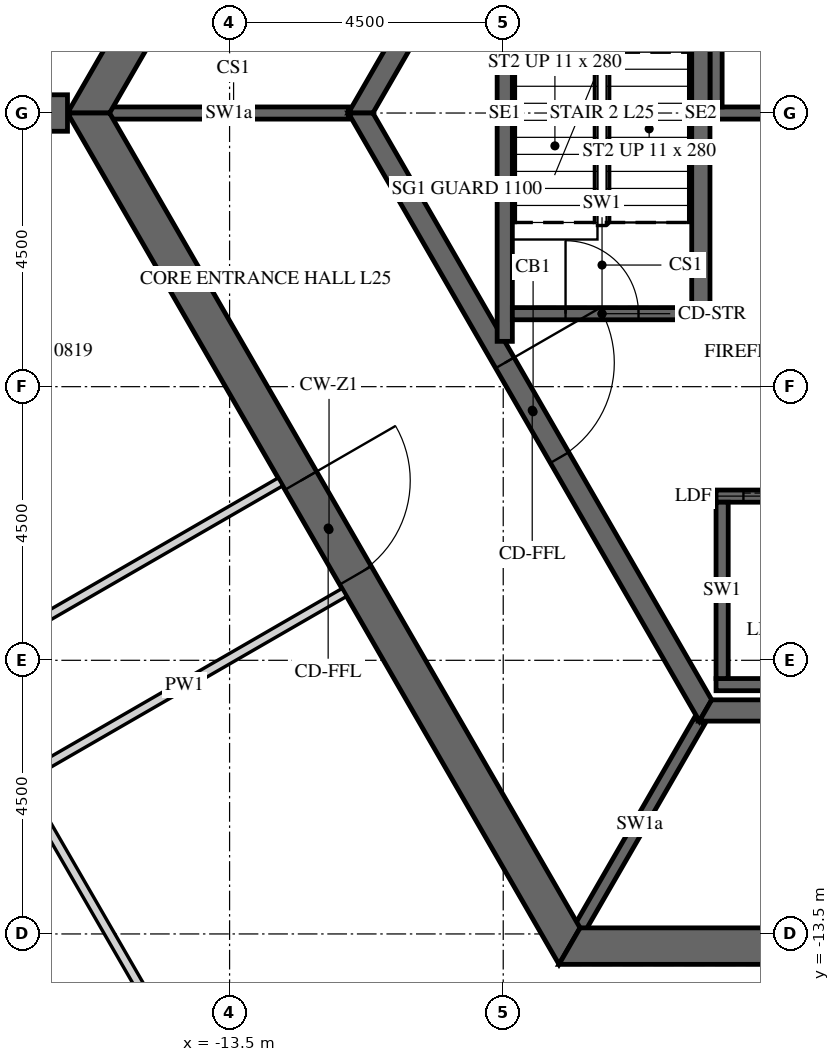
"""IFC4 building model, lengths in metres.
Left out: names, types, materials, properties, quantities, classifications, styles, units other than length and angle.
Written with IfcOpenShell. Run it as: python <this file> out.ifc"""

import sys

from ifc_helpers import new_model, si_unit, direction, frame, frame_2d, origin, place, context, subcontext, project, spatial, polyline, rectangle, outline, extrude, element, fill, save


model = new_model("IFC4")
c1 = context("Model", 3, precision=1e-05, world=origin(), true_north=direction((0.0, 1.0)))
c2 = subcontext(c1, "Body", "Model", "MODEL_VIEW")
j1 = project(units=[si_unit("LENGTHUNIT", "METRE"), si_unit("PLANEANGLEUNIT", "RADIAN")], contexts=[c1])
p1 = place(None, origin())
s1 = spatial("IfcSite", under=j1, at=p1, CompositionType="ELEMENT")
p2 = place(p1, origin())
s2 = spatial("IfcBuilding", under=s1, at=p2, CompositionType="ELEMENT")
p3 = place(p2, frame((0.0, 0.0, 111.6)))
s3 = spatial("IfcBuildingStorey", under=s2, at=p3, CompositionType="ELEMENT", Elevation=111.6)
p4 = place(p3, frame((-7.91, 13.7, -0.15), z_axis=(0.0, 0.0, 1.0), x_axis=(-0.499999880136, -0.866025472988, 0.0)))
e1 = element("IfcWall", 1, at=p4, inside=s3, PredefinedType="SHEAR", context=c2, shape_type="SweptSolid", body=[
    extrude(outline(polyline([(-0.173, -0.3), (15.993, -0.3), (15.646, 0.3), (0.173, 0.3), (-0.173, -0.3)])), origin(), (0.0, 0.0, 1.0), 3.9),
])
p5 = place(p4, frame((7.039, 0.0, 0.15)))
e2 = element("IfcOpeningElement", 2, at=p5, cuts=e1, PredefinedType="OPENING", context=c2, shape_type="SweptSolid", body=[
    extrude(rectangle(XDim=1.8, YDim=2.4, at=frame_2d((0.9, 1.2))), frame((0.0, 0.31, 0.0), z_axis=(0.0, -1.0, 0.0), x_axis=(1.0, 0.0, 0.0)), (0.0, 0.0, 1.0), 0.62),
])
p6 = place(p3, frame((-15.819, 0.0, -0.15), z_axis=(0.0, 0.0, 1.0), x_axis=(0.499999880136, -0.866025472988, 0.0)))
e3 = element("IfcWall", 3, at=p6, inside=s3, PredefinedType="SHEAR", context=c2, shape_type="SweptSolid", body=[
    extrude(outline(polyline([(-0.173, -0.3), (15.993, -0.3), (15.646, 0.3), (0.173, 0.3), (-0.173, -0.3)])), origin(), (0.0, 0.0, 1.0), 3.9),
])
p7 = place(p6, frame((6.981, 0.0, 0.15)))
e4 = element("IfcOpeningElement", 4, at=p7, cuts=e3, PredefinedType="OPENING", context=c2, shape_type="SweptSolid", body=[
    extrude(rectangle(XDim=1.8, YDim=2.4, at=frame_2d((0.9, 1.2))), frame((0.0, 0.31, 0.0), z_axis=(0.0, -1.0, 0.0), x_axis=(1.0, 0.0, 0.0)), (0.0, 0.0, 1.0), 0.62),
])
p8 = place(p3, frame((-7.91, -13.7, -0.15), z_axis=(0.0, 0.0, 1.0), x_axis=(1.0, 0.0, 0.0)))
e5 = element("IfcWall", 5, at=p8, inside=s3, PredefinedType="SHEAR", context=c2, shape_type="SweptSolid", body=[
    extrude(outline(polyline([(-0.173, -0.3), (15.993, -0.3), (15.646, 0.3), (0.173, 0.3), (-0.173, -0.3)])), origin(), (0.0, 0.0, 1.0), 3.9),
])
p9 = place(p8, frame((7.31, 0.0, 0.15)))
e6 = element("IfcOpeningElement", 6, at=p9, cuts=e5, PredefinedType="OPENING", context=c2, shape_type="SweptSolid", body=[
    extrude(rectangle(XDim=1.2, YDim=2.4, at=frame_2d((0.6, 1.2))), frame((0.0, 0.31, 0.0), z_axis=(0.0, -1.0, 0.0), x_axis=(1.0, 0.0, 0.0)), (0.0, 0.0, 1.0), 0.62),
])
p10 = place(p3, frame((-16.166, 0.0, -0.15), z_axis=(0.0, 0.0, 1.0), x_axis=(-1.0, 0.0, 0.0)))
e7 = element("IfcWall", 7, at=p10, inside=s3, PredefinedType="SHEAR", context=c2, shape_type="SweptSolid", body=[
    extrude(rectangle(XDim=16.509, YDim=0.6, at=frame_2d((8.254, 0.0))), origin(), (0.0, 0.0, 1.0), 3.9),
])
p11 = place(p10, frame((7.354, 0.0, 0.15)))
e8 = element("IfcOpeningElement", 8, at=p11, cuts=e7, PredefinedType="OPENING", context=c2, shape_type="SweptSolid", body=[
    extrude(rectangle(XDim=1.8, YDim=2.4, at=frame_2d((0.9, 1.2))), frame((0.0, 0.31, 0.0), z_axis=(0.0, -1.0, 0.0), x_axis=(1.0, 0.0, 0.0)), (0.0, 0.0, 1.0), 0.62),
])
p12 = place(p3, frame((-5.673, 9.825, -0.15), z_axis=(0.0, 0.0, 1.0), x_axis=(-0.499995046907, -0.866028263435, 0.0)))
e9 = element("IfcWall", 9, at=p12, inside=s3, PredefinedType="SHEAR", context=c2, shape_type="SweptSolid", body=[
    extrude(outline(polyline([(-0.101, -0.175), (11.446, -0.175), (11.244, 0.175), (0.101, 0.175), (-0.101, -0.175)])), origin(), (0.0, 0.0, 1.0), 3.9),
])
p13 = place(p12, frame((4.801, 0.0, 0.15)))
e10 = element("IfcOpeningElement", 10, at=p13, cuts=e9, PredefinedType="OPENING", context=c2, shape_type="SweptSolid", body=[
    extrude(rectangle(XDim=1.8, YDim=2.4, at=frame_2d((0.9, 1.2))), frame((0.0, 0.185, 0.0), z_axis=(0.0, -1.0, 0.0), x_axis=(1.0, 0.0, 0.0)), (0.0, 0.0, 1.0), 0.37),
])
p14 = place(p3, frame((-11.345, 0.0, -0.15), z_axis=(0.0, 0.0, 1.0), x_axis=(0.499995046907, -0.866028263435, 0.0)))
e11 = element("IfcWall", 11, at=p14, inside=s3, PredefinedType="SHEAR", context=c2, shape_type="SweptSolid", body=[
    extrude(outline(polyline([(-0.101, -0.175), (11.446, -0.175), (11.244, 0.175), (0.101, 0.175), (-0.101, -0.175)])), origin(), (0.0, 0.0, 1.0), 3.9),
])
p15 = place(p14, frame((4.744, 0.0, 0.15)))
e12 = element("IfcOpeningElement", 12, at=p15, cuts=e11, PredefinedType="OPENING", context=c2, shape_type="SweptSolid", body=[
    extrude(rectangle(XDim=1.8, YDim=2.4, at=frame_2d((0.9, 1.2))), frame((0.0, 0.185, 0.0), z_axis=(0.0, -1.0, 0.0), x_axis=(1.0, 0.0, 0.0)), (0.0, 0.0, 1.0), 0.37),
])
p16 = place(p3, frame((-5.673, -9.825, -0.15), z_axis=(0.0, 0.0, 1.0), x_axis=(1.0, 0.0, 0.0)))
e13 = element("IfcWall", 13, at=p16, inside=s3, PredefinedType="SHEAR", context=c2, shape_type="SweptSolid", body=[
    extrude(outline(polyline([(-0.101, -0.175), (11.446, -0.175), (11.244, 0.175), (0.101, 0.175), (-0.101, -0.175)])), origin(), (0.0, 0.0, 1.0), 3.9),
])
p17 = place(p3, frame((-5.6, 0.0, -0.25), z_axis=(0.0, 0.0, 1.0), x_axis=(1.0, 0.0, 0.0)))
e14 = element("IfcWall", 14, at=p17, inside=s3, PredefinedType="SHEAR", context=c2, shape_type="SweptSolid", body=[
    extrude(rectangle(XDim=11.2, YDim=0.2, at=frame_2d((5.6, 0.0))), origin(), (0.0, 0.0, 1.0), 3.9),
])
p18 = place(p3, frame((-5.5, 0.1, -0.25), z_axis=(0.0, 0.0, 1.0), x_axis=(0.0, 1.0, 0.0)))
e15 = element("IfcWall", 15, at=p18, inside=s3, PredefinedType="SHEAR", context=c2, shape_type="SweptSolid", body=[
    extrude(rectangle(XDim=3.1, YDim=0.2, at=frame_2d((1.55, 0.0))), origin(), (0.0, 0.0, 1.0), 3.9),
])
p19 = place(p3, frame((-5.5, -6.3, -0.25), z_axis=(0.0, 0.0, 1.0), x_axis=(1.0, 0.0, 0.0)))
e16 = element("IfcWall", 16, at=p19, inside=s3, PredefinedType="SHEAR", context=c2, shape_type="SweptSolid", body=[
    extrude(rectangle(XDim=9.2, YDim=0.2, at=frame_2d((4.6, 0.0))), origin(), (0.0, 0.0, 1.0), 3.9),
])
p20 = place(p19, frame((0.45, 0.0, 0.25)))
e17 = element("IfcOpeningElement", 17, at=p20, cuts=e16, PredefinedType="OPENING", context=c2, shape_type="SweptSolid", body=[
    extrude(rectangle(XDim=1.1, YDim=2.1, at=frame_2d((0.55, 1.05))), frame((0.0, 0.11, 0.0), z_axis=(0.0, -1.0, 0.0), x_axis=(1.0, 0.0, 0.0)), (0.0, 0.0, 1.0), 0.22),
])
p21 = place(p19, frame((2.25, 0.0, 0.25)))
e18 = element("IfcOpeningElement", 18, at=p21, cuts=e16, PredefinedType="OPENING", context=c2, shape_type="SweptSolid", body=[
    extrude(rectangle(XDim=1.1, YDim=2.1, at=frame_2d((0.55, 1.05))), frame((0.0, 0.11, 0.0), z_axis=(0.0, -1.0, 0.0), x_axis=(1.0, 0.0, 0.0)), (0.0, 0.0, 1.0), 0.22),
])
p22 = place(p19, frame((4.05, 0.0, 0.25)))
e19 = element("IfcOpeningElement", 19, at=p22, cuts=e16, PredefinedType="OPENING", context=c2, shape_type="SweptSolid", body=[
    extrude(rectangle(XDim=1.1, YDim=2.1, at=frame_2d((0.55, 1.05))), frame((0.0, 0.11, 0.0), z_axis=(0.0, -1.0, 0.0), x_axis=(1.0, 0.0, 0.0)), (0.0, 0.0, 1.0), 0.22),
])
p23 = place(p19, frame((5.85, 0.0, 0.25)))
e20 = element("IfcOpeningElement", 20, at=p23, cuts=e16, PredefinedType="OPENING", context=c2, shape_type="SweptSolid", body=[
    extrude(rectangle(XDim=1.1, YDim=2.1, at=frame_2d((0.55, 1.05))), frame((0.0, 0.11, 0.0), z_axis=(0.0, -1.0, 0.0), x_axis=(1.0, 0.0, 0.0)), (0.0, 0.0, 1.0), 0.22),
])
p24 = place(p19, frame((7.65, 0.0, 0.25)))
e21 = element("IfcOpeningElement", 21, at=p24, cuts=e16, PredefinedType="OPENING", context=c2, shape_type="SweptSolid", body=[
    extrude(rectangle(XDim=1.1, YDim=2.1, at=frame_2d((0.55, 1.05))), frame((0.0, 0.11, 0.0), z_axis=(0.0, -1.0, 0.0), x_axis=(1.0, 0.0, 0.0)), (0.0, 0.0, 1.0), 0.22),
])
p25 = place(p3, frame((-5.5, -9.4, -0.25), z_axis=(0.0, 0.0, 1.0), x_axis=(1.0, 0.0, 0.0)))
e22 = element("IfcWall", 22, at=p25, inside=s3, PredefinedType="SHEAR", context=c2, shape_type="SweptSolid", body=[
    extrude(rectangle(XDim=9.2, YDim=0.2, at=frame_2d((4.6, 0.0))), origin(), (0.0, 0.0, 1.0), 3.9),
])
p26 = place(p3, frame((-5.4, -9.3, -0.25), z_axis=(0.0, 0.0, 1.0), x_axis=(0.0, 1.0, 0.0)))
e23 = element("IfcWall", 23, at=p26, inside=s3, PredefinedType="SHEAR", context=c2, shape_type="SweptSolid", body=[
    extrude(rectangle(XDim=2.9, YDim=0.2, at=frame_2d((1.45, 0.0))), origin(), (0.0, 0.0, 1.0), 3.9),
])
p27 = place(p3, frame((-11.547, 0.0, -0.15), z_axis=(0.0, 0.0, 1.0), x_axis=(-1.0, 0.0, 0.0)))
e24 = element("IfcWall", 24, at=p27, inside=s3, PredefinedType="SHEAR", context=c2, shape_type="SweptSolid", body=[
    extrude(rectangle(XDim=3.926, YDim=0.2, at=frame_2d((1.963, 0.0))), origin(), (0.0, 0.0, 1.0), 3.9),
])
p28 = place(p3, frame((-5.773, -10.0, -0.15), z_axis=(0.0, 0.0, 1.0), x_axis=(-0.500038251005, -0.86600331843, 0.0)))
e25 = element("IfcWall", 25, at=p28, inside=s3, PredefinedType="SHEAR", context=c2, shape_type="SweptSolid", body=[
    extrude(rectangle(XDim=3.926, YDim=0.2, at=frame_2d((1.963, 0.0))), origin(), (0.0, 0.0, 1.0), 3.9),
])
p29 = place(p3, frame((-5.75, -3.4, -0.25), z_axis=(0.0, 0.0, 1.0), x_axis=(0.0, 1.0, 0.0)))
e26 = element("IfcWall", 26, at=p29, inside=s3, PredefinedType="SHEAR", context=c2, shape_type="SweptSolid", body=[
    extrude(rectangle(XDim=6.8, YDim=0.3, at=frame_2d((3.4, 0.0))), origin(), (0.0, 0.0, 1.0), 3.9),
])
p30 = place(p3, frame((-8.975, -3.755, -0.25), z_axis=(0.0, 0.0, 1.0), x_axis=(0.0, 1.0, 0.0)))
e27 = element("IfcWall", 27, at=p30, inside=s3, PredefinedType="SHEAR", context=c2, shape_type="SweptSolid", body=[
    extrude(rectangle(XDim=7.51, YDim=0.25, at=frame_2d((3.755, 0.0))), origin(), (0.0, 0.0, 1.0), 3.9),
])
p31 = place(p3, frame((-8.85, -3.3, -0.25), z_axis=(0.0, 0.0, 1.0), x_axis=(1.0, 0.0, 0.0)))
e28 = element("IfcWall", 28, at=p31, inside=s3, PredefinedType="SHEAR", context=c2, shape_type="SweptSolid", body=[
    extrude(rectangle(XDim=2.95, YDim=0.2, at=frame_2d((1.475, 0.0))), origin(), (0.0, 0.0, 1.0), 3.9),
])
p32 = place(p31, frame((0.875, 0.0, 0.25)))
e29 = element("IfcOpeningElement", 29, at=p32, cuts=e28, PredefinedType="OPENING", context=c2, shape_type="SweptSolid", body=[
    extrude(rectangle(XDim=1.2, YDim=2.4, at=frame_2d((0.6, 1.2))), frame((0.0, 0.11, 0.0), z_axis=(0.0, -1.0, 0.0), x_axis=(1.0, 0.0, 0.0)), (0.0, 0.0, 1.0), 0.22),
])
p33 = place(p3, frame((-24.09, -2.175, 0.0), z_axis=(0.0, 0.0, 1.0), x_axis=(0.499996832073, -0.86602723278, 0.0)))
e30 = element("IfcWall", 30, at=p33, inside=s3, PredefinedType="PARTITIONING", context=c2, shape_type="SweptSolid", body=[
    extrude(rectangle(XDim=23.877, YDim=0.15, at=frame_2d((11.938, 0.0))), origin(), (0.0, 0.0, 1.0), 2.988),
])
p34 = place(p33, frame((4.643, 0.0, 0.0)))
e31 = element("IfcOpeningElement", 31, at=p34, cuts=e30, PredefinedType="OPENING", context=c2, shape_type="SweptSolid", body=[
    extrude(rectangle(XDim=1.0, YDim=2.1, at=frame_2d((0.5, 1.05))), frame((0.0, 0.085, 0.0), z_axis=(0.0, -1.0, 0.0), x_axis=(1.0, 0.0, 0.0)), (0.0, 0.0, 1.0), 0.17),
])
p35 = place(p33, frame((11.472, 0.0, 0.0)))
e32 = element("IfcOpeningElement", 32, at=p35, cuts=e30, PredefinedType="OPENING", context=c2, shape_type="SweptSolid", body=[
    extrude(rectangle(XDim=1.0, YDim=2.1, at=frame_2d((0.5, 1.05))), frame((0.0, 0.085, 0.0), z_axis=(0.0, -1.0, 0.0), x_axis=(1.0, 0.0, 0.0)), (0.0, 0.0, 1.0), 0.17),
])
p36 = place(p33, frame((21.925, 0.0, 0.0)))
e33 = element("IfcOpeningElement", 33, at=p36, cuts=e30, PredefinedType="OPENING", context=c2, shape_type="SweptSolid", body=[
    extrude(rectangle(XDim=1.0, YDim=2.1, at=frame_2d((0.5, 1.05))), frame((0.0, 0.085, 0.0), z_axis=(0.0, -1.0, 0.0), x_axis=(1.0, 0.0, 0.0)), (0.0, 0.0, 1.0), 0.17),
])
p37 = place(p3, frame((-12.664, -6.066, 0.0), z_axis=(0.0, 0.0, 1.0), x_axis=(-0.866023618125, -0.500003092839, 0.0)))
e34 = element("IfcWall", 34, at=p37, inside=s3, PredefinedType="PARTITIONING", context=c2, shape_type="SweptSolid", body=[
    extrude(rectangle(XDim=6.15, YDim=0.15, at=frame_2d((3.075, 0.0))), origin(), (0.0, 0.0, 1.0), 2.988),
])
p38 = place(p3, frame((-11.197, -20.907, 0.0), z_axis=(0.0, 0.0, 1.0), x_axis=(-0.500004557924, 0.86602277225, 0.0)))
e35 = element("IfcWall", 35, at=p38, inside=s3, PredefinedType="PARTITIONING", context=c2, shape_type="SweptSolid", body=[
    extrude(rectangle(XDim=11.487, YDim=0.15, at=frame_2d((5.743, 0.0))), origin(), (0.0, 0.0, 1.0), 2.988),
])
p39 = place(p38, frame((5.293, 0.0, 0.0)))
e36 = element("IfcOpeningElement", 36, at=p39, cuts=e35, PredefinedType="OPENING", context=c2, shape_type="SweptSolid", body=[
    extrude(rectangle(XDim=0.9, YDim=2.1, at=frame_2d((0.45, 1.05))), frame((0.0, 0.085, 0.0), z_axis=(0.0, -1.0, 0.0), x_axis=(1.0, 0.0, 0.0)), (0.0, 0.0, 1.0), 0.17),
])
p40 = place(p3, frame((-16.875, -10.922, 0.0), z_axis=(0.0, 0.0, 1.0), x_axis=(0.866023634079, 0.500003065207, 0.0)))
e37 = element("IfcWall", 37, at=p40, inside=s3, PredefinedType="PARTITIONING", context=c2, shape_type="SweptSolid", body=[
    extrude(rectangle(XDim=6.075, YDim=0.15, at=frame_2d((3.038, 0.0))), origin(), (0.0, 0.0, 1.0), 2.988),
])
p41 = place(p7, origin())
e38 = element("IfcDoor", 38, at=p41, inside=s3, OperationType="DOUBLE_DOOR_SINGLE_SWING", PredefinedType="DOOR", context=c2, shape_type="SweptSolid", body=[
    extrude(rectangle(XDim=1.8, YDim=2.4, at=frame_2d((0.9, 1.2))), frame((0.0, 0.025, 0.0), z_axis=(0.0, -1.0, 0.0), x_axis=(1.0, 0.0, 0.0)), (0.0, 0.0, 1.0), 0.05),
])
fill(e4, e38)
p42 = place(p15, origin())
e39 = element("IfcDoor", 39, at=p42, inside=s3, OperationType="DOUBLE_DOOR_SINGLE_SWING", PredefinedType="DOOR", context=c2, shape_type="SweptSolid", body=[
    extrude(rectangle(XDim=1.8, YDim=2.4, at=frame_2d((0.9, 1.2))), frame((0.0, 0.025, 0.0), z_axis=(0.0, -1.0, 0.0), x_axis=(1.0, 0.0, 0.0)), (0.0, 0.0, 1.0), 0.05),
])
fill(e12, e39)
p43 = place(p32, origin())
e40 = element("IfcDoor", 40, at=p43, inside=s3, OperationType="SINGLE_SWING_LEFT", PredefinedType="DOOR", context=c2, shape_type="SweptSolid", body=[
    extrude(rectangle(XDim=1.2, YDim=2.4, at=frame_2d((0.6, 1.2))), frame((0.0, 0.025, 0.0), z_axis=(0.0, -1.0, 0.0), x_axis=(1.0, 0.0, 0.0)), (0.0, 0.0, 1.0), 0.05),
])
fill(e29, e40)
p44 = place(p20, origin())
e41 = element("IfcDoor", 41, at=p44, inside=s3, OperationType="SLIDING_TO_LEFT", PredefinedType="DOOR", context=c2, shape_type="SweptSolid", body=[
    extrude(rectangle(XDim=1.1, YDim=2.1, at=frame_2d((0.55, 1.05))), frame((0.0, 0.025, 0.0), z_axis=(0.0, -1.0, 0.0), x_axis=(1.0, 0.0, 0.0)), (0.0, 0.0, 1.0), 0.05),
])
fill(e17, e41)
save(model, sys.argv[1])
